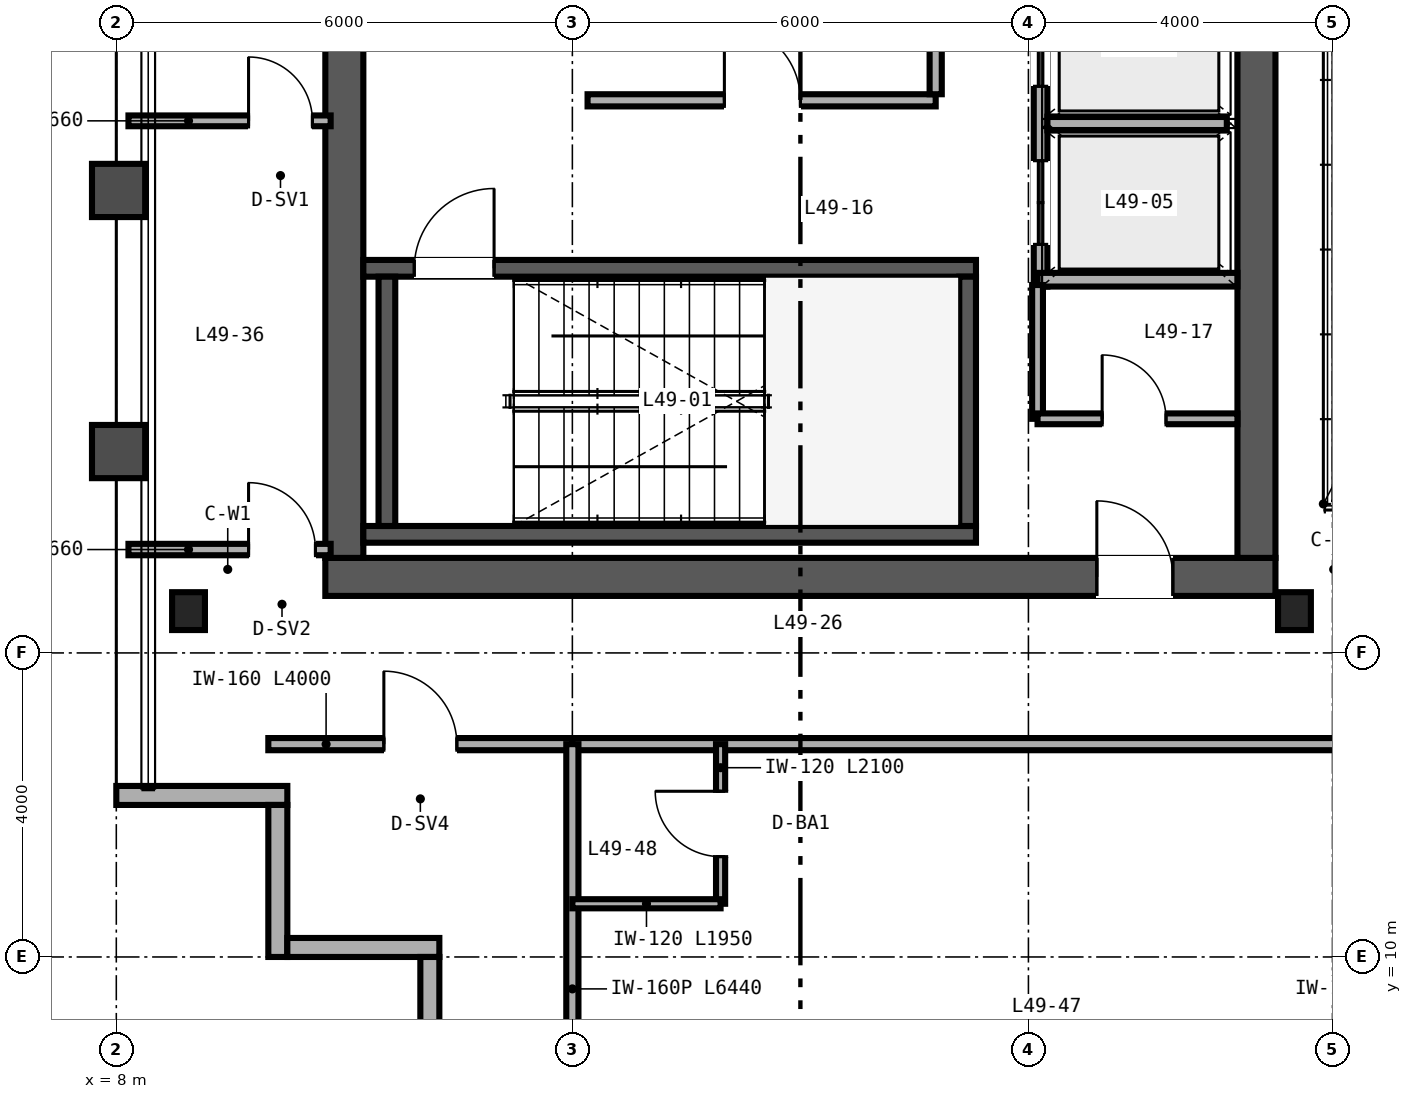
"""IFC4 building model, lengths in metres.
Left out: names, types, materials, properties, quantities, classifications, styles, units other than length and angle.
Written with IfcOpenShell. Run it as: python <this file> out.ifc"""

import sys

from ifc_helpers import new_model, si_unit, direction, frame, frame_2d, origin, origin_2d, place, context, subcontext, project, spatial, rectangle, i_section, extrude, source, transform, mapped, element, fill, save


model = new_model("IFC4")
c1 = context("Model", 3, precision=1e-05, world=origin(), true_north=direction((0.0, 1.0)))
c2 = subcontext(c1, "Body", "Model", "MODEL_VIEW")
j1 = project(units=[si_unit("LENGTHUNIT", "METRE"), si_unit("PLANEANGLEUNIT", "RADIAN")], contexts=[c1])
p1 = place(None, origin())
s1 = spatial("IfcSite", under=j1, at=p1, CompositionType="ELEMENT")
p2 = place(p1, origin())
s2 = spatial("IfcBuilding", under=s1, at=p2, CompositionType="ELEMENT")
p3 = place(p2, frame((0.0, 0.0, 195.6)))
s3 = spatial("IfcBuildingStorey", under=s2, at=p3, CompositionType="ELEMENT", Elevation=195.6)
p4 = place(p3, frame((10.75, 15.0, 0.0), z_axis=(0.0, 0.0, 1.0), x_axis=(1.0, 0.0, 0.0)))
e1 = element("IfcWall", 1, at=p4, inside=s3, PredefinedType="SHEAR", context=c2, shape_type="SweptSolid", body=[
    extrude(rectangle(XDim=12.5, YDim=0.5, at=frame_2d((6.25, 0.0))), origin(), (0.0, 0.0, 1.0), 3.37),
])
p5 = place(p4, frame((10.15, 0.0, 0.0)))
e2 = element("IfcOpeningElement", 2, at=p5, cuts=e1, PredefinedType="OPENING", context=c2, shape_type="SweptSolid", body=[
    extrude(rectangle(XDim=1.0, YDim=2.15, at=frame_2d((0.5, 1.075))), frame((0.0, 0.26, 0.0), z_axis=(0.0, -1.0, 0.0), x_axis=(1.0, 0.0, 0.0)), (0.0, 0.0, 1.0), 0.52),
])
for number, where, z_axis, x_axis in (
    (3, (11.0, 15.25, 0.0), (0.0, 0.0, 1.0), (0.0, 1.0, 0.0)),
    (4, (23.0, 15.25, 0.0), (0.0, 0.0, 1.0), (0.0, 1.0, 0.0)),
):
    element("IfcWall", number, at=place(p3, frame(where, z_axis=z_axis, x_axis=x_axis)), inside=s3, PredefinedType="SHEAR", context=c2, shape_type="SweptSolid", body=[
        extrude(rectangle(XDim=21.5, YDim=0.5, at=frame_2d((10.75, 0.0))), origin(), (0.0, 0.0, 1.0), 3.37),
    ])
p6 = place(p3, frame((11.25, 15.56, 0.0), z_axis=(0.0, 0.0, 1.0), x_axis=(1.0, 0.0, 0.0)))
e5 = element("IfcWall", 5, at=p6, inside=s3, PredefinedType="SHEAR", context=c2, shape_type="SweptSolid", body=[
    extrude(rectangle(XDim=8.06, YDim=0.22, at=frame_2d((4.03, 0.0))), origin(), (0.0, 0.0, 1.0), 3.4),
])
p7 = place(p3, frame((11.25, 19.06, 0.0), z_axis=(0.0, 0.0, 1.0), x_axis=(1.0, 0.0, 0.0)))
e6 = element("IfcWall", 6, at=p7, inside=s3, PredefinedType="SHEAR", context=c2, shape_type="SweptSolid", body=[
    extrude(rectangle(XDim=8.06, YDim=0.22, at=frame_2d((4.03, 0.0))), origin(), (0.0, 0.0, 1.0), 3.4),
])
p8 = place(p7, frame((0.67, 0.0, 0.0)))
e7 = element("IfcOpeningElement", 7, at=p8, cuts=e6, PredefinedType="OPENING", context=c2, shape_type="SweptSolid", body=[
    extrude(rectangle(XDim=1.05, YDim=2.15, at=frame_2d((0.525, 1.075))), frame((0.0, 0.12, 0.0), z_axis=(0.0, -1.0, 0.0), x_axis=(1.0, 0.0, 0.0)), (0.0, 0.0, 1.0), 0.24),
])
for number, where, z_axis, x_axis in (
    (8, (11.56, 15.67, 0.0), (0.0, 0.0, 1.0), (0.0, 1.0, 0.0)),
    (9, (19.2, 15.67, 0.0), (0.0, 0.0, 1.0), (0.0, 1.0, 0.0)),
):
    element("IfcWall", number, at=place(p3, frame(where, z_axis=z_axis, x_axis=x_axis)), inside=s3, PredefinedType="SHEAR", context=c2, shape_type="SweptSolid", body=[
        extrude(rectangle(XDim=3.28, YDim=0.22, at=frame_2d((1.64, 0.0))), origin(), (0.0, 0.0, 1.0), 3.4),
    ])
m1 = source(origin(), c2, "Body", "SweptSolid", [
    extrude(i_section(OverallWidth=0.432, OverallDepth=0.498, WebThickness=0.056, FlangeThickness=0.089, FilletRadius=0.025, at=origin_2d()), origin(), (0.0, 0.0, 1.0), 3.37),
])
for number, where, z_axis, x_axis in (
    (10, (8.95, 14.55, 0.0), (0.0, 0.0, 1.0), (1.0, 0.0, 0.0)),
    (11, (23.5, 14.55, 0.0), (0.0, 0.0, 1.0), (1.0, 0.0, 0.0)),
):
    element("IfcColumn", number, at=place(p3, frame(where, z_axis=z_axis, x_axis=x_axis)), inside=s3, PredefinedType="COLUMN", context=c2, shape_type="MappedRepresentation", body=[
        mapped(m1, transform((0.0, 0.0, 0.0), scale=1.0)),
    ])
p9 = place(p3, frame((8.0, 12.125, 0.0), z_axis=(0.0, 0.0, 1.0), x_axis=(1.0, 0.0, 0.0)))
e12 = element("IfcWall", 12, at=p9, inside=s3, PredefinedType="SOLIDWALL", context=c2, shape_type="SweptSolid", body=[
    extrude(rectangle(XDim=2.25, YDim=0.25, at=frame_2d((1.125, 0.0))), origin(), (0.0, 0.0, 1.0), 3.37),
])
for number, where, z_axis, x_axis in (
    (13, (10.125, 12.0, 0.0), (0.0, 0.0, 1.0), (0.0, -1.0, 0.0)),
    (14, (10.25, 10.125, 0.0), (0.0, 0.0, 1.0), (1.0, 0.0, 0.0)),
    (15, (12.125, 10.0, 0.0), (0.0, 0.0, 1.0), (0.0, -1.0, 0.0)),
):
    element("IfcWall", number, at=place(p3, frame(where, z_axis=z_axis, x_axis=x_axis)), inside=s3, PredefinedType="SOLIDWALL", context=c2, shape_type="SweptSolid", body=[
        extrude(rectangle(XDim=2.0, YDim=0.25, at=frame_2d((1.0, 0.0))), origin(), (0.0, 0.0, 1.0), 3.37),
    ])
p10 = place(p3, frame((20.16, 18.82, 0.0), z_axis=(0.0, 0.0, 1.0), x_axis=(0.0, 1.0, 0.0)))
e16 = element("IfcWall", 16, at=p10, inside=s3, PredefinedType="SOLIDWALL", context=c2, shape_type="SweptSolid", body=[
    extrude(rectangle(XDim=6.32, YDim=0.18, at=frame_2d((3.16, 0.0))), origin(), (0.0, 0.0, 1.0), 2.47),
])
p11 = place(p10, frame((0.555, 0.0, 0.0)))
e17 = element("IfcOpeningElement", 17, at=p11, cuts=e16, PredefinedType="OPENING", context=c2, shape_type="SweptSolid", body=[
    extrude(rectangle(XDim=1.1, YDim=2.2, at=frame_2d((0.55, 1.1))), frame((0.0, 0.1, 0.0), z_axis=(0.0, -1.0, 0.0), x_axis=(1.0, 0.0, 0.0)), (0.0, 0.0, 1.0), 0.2),
])
p12 = place(p10, frame((2.635, 0.0, 0.0)))
e18 = element("IfcOpeningElement", 18, at=p12, cuts=e16, PredefinedType="OPENING", context=c2, shape_type="SweptSolid", body=[
    extrude(rectangle(XDim=1.1, YDim=2.2, at=frame_2d((0.55, 1.1))), frame((0.0, 0.1, 0.0), z_axis=(0.0, -1.0, 0.0), x_axis=(1.0, 0.0, 0.0)), (0.0, 0.0, 1.0), 0.2),
])
p13 = place(p10, frame((4.69, 0.0, 0.0)))
e19 = element("IfcOpeningElement", 19, at=p13, cuts=e16, PredefinedType="OPENING", context=c2, shape_type="SweptSolid", body=[
    extrude(rectangle(XDim=1.1, YDim=2.2, at=frame_2d((0.55, 1.1))), frame((0.0, 0.1, 0.0), z_axis=(0.0, -1.0, 0.0), x_axis=(1.0, 0.0, 0.0)), (0.0, 0.0, 1.0), 0.2),
])
p14 = place(p3, frame((20.12, 18.91, 0.0), z_axis=(0.0, 0.0, 1.0), x_axis=(1.0, 0.0, 0.0)))
e20 = element("IfcWall", 20, at=p14, inside=s3, PredefinedType="SOLIDWALL", context=c2, shape_type="SweptSolid", body=[
    extrude(rectangle(XDim=2.63, YDim=0.18, at=frame_2d((1.315, 0.0))), origin(), (0.0, 0.0, 1.0), 3.37),
])
p15 = place(p3, frame((20.25, 20.965, 0.0), z_axis=(0.0, 0.0, 1.0), x_axis=(1.0, 0.0, 0.0)))
e21 = element("IfcWall", 21, at=p15, inside=s3, PredefinedType="SOLIDWALL", context=c2, shape_type="SweptSolid", body=[
    extrude(rectangle(XDim=2.36, YDim=0.18, at=frame_2d((1.18, 0.0))), origin(), (0.0, 0.0, 1.0), 2.47),
])
p16 = place(p3, frame((14.2, 21.27, 0.0), z_axis=(0.0, 0.0, 1.0), x_axis=(1.0, 0.0, 0.0)))
e22 = element("IfcWall", 22, at=p16, inside=s3, PredefinedType="PARTITIONING", context=c2, shape_type="SweptSolid", body=[
    extrude(rectangle(XDim=4.58, YDim=0.16, at=frame_2d((2.29, 0.0))), origin(), (0.0, 0.0, 1.0), 3.37),
])
p17 = place(p16, frame((1.8, 0.0, 0.0)))
e23 = element("IfcOpeningElement", 23, at=p17, cuts=e22, PredefinedType="OPENING", context=c2, shape_type="SweptSolid", body=[
    extrude(rectangle(XDim=1.0, YDim=2.15, at=frame_2d((0.5, 1.075))), frame((0.0, 0.09, 0.0), z_axis=(0.0, -1.0, 0.0), x_axis=(1.0, 0.0, 0.0)), (0.0, 0.0, 1.0), 0.18),
])
p18 = place(p3, frame((18.78, 21.35, 0.0), z_axis=(0.0, 0.0, 1.0), x_axis=(0.0, 1.0, 0.0)))
e24 = element("IfcWall", 24, at=p18, inside=s3, PredefinedType="PARTITIONING", context=c2, shape_type="SweptSolid", body=[
    extrude(rectangle(XDim=3.81, YDim=0.16, at=frame_2d((1.905, 0.0))), origin(), (0.0, 0.0, 1.0), 3.37),
])
p19 = place(p3, frame((20.12, 17.08, 0.0), z_axis=(0.0, 0.0, 1.0), x_axis=(0.0, 1.0, 0.0)))
e25 = element("IfcWall", 25, at=p19, inside=s3, PredefinedType="PARTITIONING", context=c2, shape_type="SweptSolid", body=[
    extrude(rectangle(XDim=1.76, YDim=0.142, at=frame_2d((0.88, 0.0))), origin(), (0.0, 0.0, 1.0), 3.37),
])
p20 = place(p3, frame((20.12, 17.08, 0.0), z_axis=(0.0, 0.0, 1.0), x_axis=(1.0, 0.0, 0.0)))
e26 = element("IfcWall", 26, at=p20, inside=s3, PredefinedType="PARTITIONING", context=c2, shape_type="SweptSolid", body=[
    extrude(rectangle(XDim=2.63, YDim=0.142, at=frame_2d((1.315, 0.0))), origin(), (0.0, 0.0, 1.0), 3.37),
])
p21 = place(p20, frame((0.85, 0.0, 0.0)))
e27 = element("IfcOpeningElement", 27, at=p21, cuts=e26, PredefinedType="OPENING", context=c2, shape_type="SweptSolid", body=[
    extrude(rectangle(XDim=0.84, YDim=2.1, at=frame_2d((0.42, 1.05))), frame((0.0, 0.081, 0.0), z_axis=(0.0, -1.0, 0.0), x_axis=(1.0, 0.0, 0.0)), (0.0, 0.0, 1.0), 0.162),
])
p22 = place(p3, frame((8.16, 15.36, 0.0), z_axis=(0.0, 0.0, 1.0), x_axis=(1.0, 0.0, 0.0)))
e28 = element("IfcWall", 28, at=p22, inside=s3, PredefinedType="PARTITIONING", context=c2, shape_type="SweptSolid", body=[
    extrude(rectangle(XDim=2.66, YDim=0.15, at=frame_2d((1.33, 0.0))), origin(), (0.0, 0.0, 1.0), 2.591),
])
p23 = place(p22, frame((1.58, 0.0, 0.0)))
e29 = element("IfcOpeningElement", 29, at=p23, cuts=e28, PredefinedType="OPENING", context=c2, shape_type="SweptSolid", body=[
    extrude(rectangle(XDim=0.88, YDim=2.15, at=frame_2d((0.44, 1.075))), frame((0.0, 0.085, 0.0), z_axis=(0.0, -1.0, 0.0), x_axis=(1.0, 0.0, 0.0)), (0.0, 0.0, 1.0), 0.17),
])
p24 = place(p3, frame((8.16, 21.0, 0.0), z_axis=(0.0, 0.0, 1.0), x_axis=(1.0, 0.0, 0.0)))
e30 = element("IfcWall", 30, at=p24, inside=s3, PredefinedType="PARTITIONING", context=c2, shape_type="SweptSolid", body=[
    extrude(rectangle(XDim=2.66, YDim=0.142, at=frame_2d((1.33, 0.0))), origin(), (0.0, 0.0, 1.0), 2.47),
])
p25 = place(p24, frame((1.58, 0.0, 0.0)))
e31 = element("IfcOpeningElement", 31, at=p25, cuts=e30, PredefinedType="OPENING", context=c2, shape_type="SweptSolid", body=[
    extrude(rectangle(XDim=0.84, YDim=2.1, at=frame_2d((0.42, 1.05))), frame((0.0, 0.081, 0.0), z_axis=(0.0, -1.0, 0.0), x_axis=(1.0, 0.0, 0.0)), (0.0, 0.0, 1.0), 0.162),
])
p26 = place(p3, frame((10.0, 12.8, 0.0), z_axis=(0.0, 0.0, 1.0), x_axis=(1.0, 0.0, 0.0)))
e32 = element("IfcWall", 32, at=p26, inside=s3, PredefinedType="PARTITIONING", context=c2, shape_type="SweptSolid", body=[
    extrude(rectangle(XDim=4.0, YDim=0.16, at=frame_2d((2.0, 0.0))), origin(), (0.0, 0.0, 1.0), 3.37),
])
p27 = place(p26, frame((1.52, 0.0, 0.0)))
e33 = element("IfcOpeningElement", 33, at=p27, cuts=e32, PredefinedType="OPENING", context=c2, shape_type="SweptSolid", body=[
    extrude(rectangle(XDim=0.96, YDim=2.15, at=frame_2d((0.48, 1.075))), frame((0.0, 0.09, 0.0), z_axis=(0.0, -1.0, 0.0), x_axis=(1.0, 0.0, 0.0)), (0.0, 0.0, 1.0), 0.18),
])
p28 = place(p3, frame((14.0, 12.8, 0.0), z_axis=(0.0, 0.0, 1.0), x_axis=(1.0, 0.0, 0.0)))
e34 = element("IfcWall", 34, at=p28, inside=s3, PredefinedType="PARTITIONING", context=c2, shape_type="SweptSolid", body=[
    extrude(rectangle(XDim=12.0, YDim=0.16, at=frame_2d((6.0, 0.0))), origin(), (0.0, 0.0, 1.0), 2.913),
])
p29 = place(p28, frame((10.7, 0.0, 0.0)))
e35 = element("IfcOpeningElement", 35, at=p29, cuts=e34, PredefinedType="OPENING", context=c2, shape_type="SweptSolid", body=[
    extrude(rectangle(XDim=0.98, YDim=2.2, at=frame_2d((0.49, 1.1))), frame((0.0, 0.09, 0.0), z_axis=(0.0, -1.0, 0.0), x_axis=(1.0, 0.0, 0.0)), (0.0, 0.0, 1.0), 0.18),
])
p30 = place(p3, frame((14.0, 6.36, 0.0), z_axis=(0.0, 0.0, 1.0), x_axis=(0.0, 1.0, 0.0)))
e36 = element("IfcWall", 36, at=p30, inside=s3, PredefinedType="PARTITIONING", context=c2, shape_type="SweptSolid", body=[
    extrude(rectangle(XDim=6.44, YDim=0.16, at=frame_2d((3.22, 0.0))), origin(), (0.0, 0.0, 1.0), 2.677),
])
p31 = place(p3, frame((15.95, 10.7, 0.0), z_axis=(0.0, 0.0, 1.0), x_axis=(0.0, 1.0, 0.0)))
e37 = element("IfcWall", 37, at=p31, inside=s3, PredefinedType="PARTITIONING", context=c2, shape_type="SweptSolid", body=[
    extrude(rectangle(XDim=2.1, YDim=0.12, at=frame_2d((1.05, 0.0))), origin(), (0.0, 0.0, 1.0), 3.37),
])
p32 = place(p31, frame((0.62, 0.0, 0.0)))
e38 = element("IfcOpeningElement", 38, at=p32, cuts=e37, PredefinedType="OPENING", context=c2, shape_type="SweptSolid", body=[
    extrude(rectangle(XDim=0.86, YDim=2.1, at=frame_2d((0.43, 1.05))), frame((0.0, 0.07, 0.0), z_axis=(0.0, -1.0, 0.0), x_axis=(1.0, 0.0, 0.0)), (0.0, 0.0, 1.0), 0.14),
])
p33 = place(p3, frame((14.0, 10.7, 0.0), z_axis=(0.0, 0.0, 1.0), x_axis=(1.0, 0.0, 0.0)))
e39 = element("IfcWall", 39, at=p33, inside=s3, PredefinedType="PARTITIONING", context=c2, shape_type="SweptSolid", body=[
    extrude(rectangle(XDim=1.95, YDim=0.12, at=frame_2d((0.975, 0.0))), origin(), (0.0, 0.0, 1.0), 3.37),
])
m2 = source(origin(), c2, "Body", "SweptSolid", [
    extrude(rectangle(XDim=1.05, YDim=2.15, at=frame_2d((0.525, 1.075))), frame((0.0, 0.025, 0.0), z_axis=(0.0, -1.0, 0.0), x_axis=(1.0, 0.0, 0.0)), (0.0, 0.0, 1.0), 0.05),
])
p34 = place(p8, origin())
e40 = element("IfcDoor", 40, at=p34, inside=s3, OperationType="SINGLE_SWING_RIGHT", PredefinedType="DOOR", context=c2, shape_type="MappedRepresentation", body=[
    mapped(m2, transform((0.0, 0.0, 0.0), scale=1.0)),
])
fill(e7, e40)
m3 = source(origin(), c2, "Body", "SweptSolid", [
    extrude(rectangle(XDim=1.1, YDim=2.2, at=frame_2d((0.55, 1.1))), frame((0.0, 0.025, 0.0), z_axis=(0.0, -1.0, 0.0), x_axis=(1.0, 0.0, 0.0)), (0.0, 0.0, 1.0), 0.05),
])
p35 = place(p11, origin())
e41 = element("IfcDoor", 41, at=p35, inside=s3, OperationType="DOUBLE_DOOR_SLIDING", PredefinedType="DOOR", context=c2, shape_type="MappedRepresentation", body=[
    mapped(m3, transform((0.0, 0.0, 0.0), scale=1.0)),
])
fill(e17, e41)
p36 = place(p12, origin())
e42 = element("IfcDoor", 42, at=p36, inside=s3, OperationType="DOUBLE_DOOR_SLIDING", PredefinedType="DOOR", context=c2, shape_type="MappedRepresentation", body=[
    mapped(m3, transform((0.0, 0.0, 0.0), scale=1.0)),
])
fill(e18, e42)
m4 = source(origin(), c2, "Body", "SweptSolid", [
    extrude(rectangle(XDim=1.0, YDim=2.15, at=frame_2d((0.5, 1.075))), frame((0.0, 0.025, 0.0), z_axis=(0.0, -1.0, 0.0), x_axis=(1.0, 0.0, 0.0)), (0.0, 0.0, 1.0), 0.05),
])
p37 = place(p17, origin())
e43 = element("IfcDoor", 43, at=p37, inside=s3, OperationType="SINGLE_SWING_LEFT", PredefinedType="DOOR", context=c2, shape_type="MappedRepresentation", body=[
    mapped(m4, transform((0.0, 0.0, 0.0), scale=1.0)),
])
fill(e23, e43)
m5 = source(origin(), c2, "Body", "SweptSolid", [
    extrude(rectangle(XDim=0.84, YDim=2.1, at=frame_2d((0.42, 1.05))), frame((0.0, 0.025, 0.0), z_axis=(0.0, -1.0, 0.0), x_axis=(1.0, 0.0, 0.0)), (0.0, 0.0, 1.0), 0.05),
])
p38 = place(p21, origin())
e44 = element("IfcDoor", 44, at=p38, inside=s3, OperationType="SINGLE_SWING_LEFT", PredefinedType="DOOR", context=c2, shape_type="MappedRepresentation", body=[
    mapped(m5, transform((0.0, 0.0, 0.0), scale=1.0)),
])
fill(e27, e44)
p39 = place(p5, origin())
e45 = element("IfcDoor", 45, at=p39, inside=s3, OperationType="SINGLE_SWING_LEFT", PredefinedType="DOOR", context=c2, shape_type="MappedRepresentation", body=[
    mapped(m4, transform((0.0, 0.0, 0.0), scale=1.0)),
])
fill(e2, e45)
m6 = source(origin(), c2, "Body", "SweptSolid", [
    extrude(rectangle(XDim=0.88, YDim=2.15, at=frame_2d((0.44, 1.075))), frame((0.0, 0.025, 0.0), z_axis=(0.0, -1.0, 0.0), x_axis=(1.0, 0.0, 0.0)), (0.0, 0.0, 1.0), 0.05),
])
p40 = place(p23, origin())
e46 = element("IfcDoor", 46, at=p40, inside=s3, OperationType="SINGLE_SWING_LEFT", PredefinedType="DOOR", context=c2, shape_type="MappedRepresentation", body=[
    mapped(m6, transform((0.0, 0.0, 0.0), scale=1.0)),
])
fill(e29, e46)
p41 = place(p25, origin())
e47 = element("IfcDoor", 47, at=p41, inside=s3, OperationType="SINGLE_SWING_LEFT", PredefinedType="DOOR", context=c2, shape_type="MappedRepresentation", body=[
    mapped(m5, transform((0.0, 0.0, 0.0), scale=1.0)),
])
fill(e31, e47)
m7 = source(origin(), c2, "Body", "SweptSolid", [
    extrude(rectangle(XDim=0.96, YDim=2.15, at=frame_2d((0.48, 1.075))), frame((0.0, 0.025, 0.0), z_axis=(0.0, -1.0, 0.0), x_axis=(1.0, 0.0, 0.0)), (0.0, 0.0, 1.0), 0.05),
])
p42 = place(p27, origin())
e48 = element("IfcDoor", 48, at=p42, inside=s3, OperationType="SINGLE_SWING_LEFT", PredefinedType="DOOR", context=c2, shape_type="MappedRepresentation", body=[
    mapped(m7, transform((0.0, 0.0, 0.0), scale=1.0)),
])
fill(e33, e48)
m8 = source(origin(), c2, "Body", "SweptSolid", [
    extrude(rectangle(XDim=0.86, YDim=2.1, at=frame_2d((0.43, 1.05))), frame((0.0, 0.025, 0.0), z_axis=(0.0, -1.0, 0.0), x_axis=(1.0, 0.0, 0.0)), (0.0, 0.0, 1.0), 0.05),
])
p43 = place(p32, origin())
e49 = element("IfcDoor", 49, at=p43, inside=s3, OperationType="SINGLE_SWING_RIGHT", PredefinedType="DOOR", context=c2, shape_type="MappedRepresentation", body=[
    mapped(m8, transform((0.0, 0.0, 0.0), scale=1.0)),
])
fill(e38, e49)
save(model, sys.argv[1])
